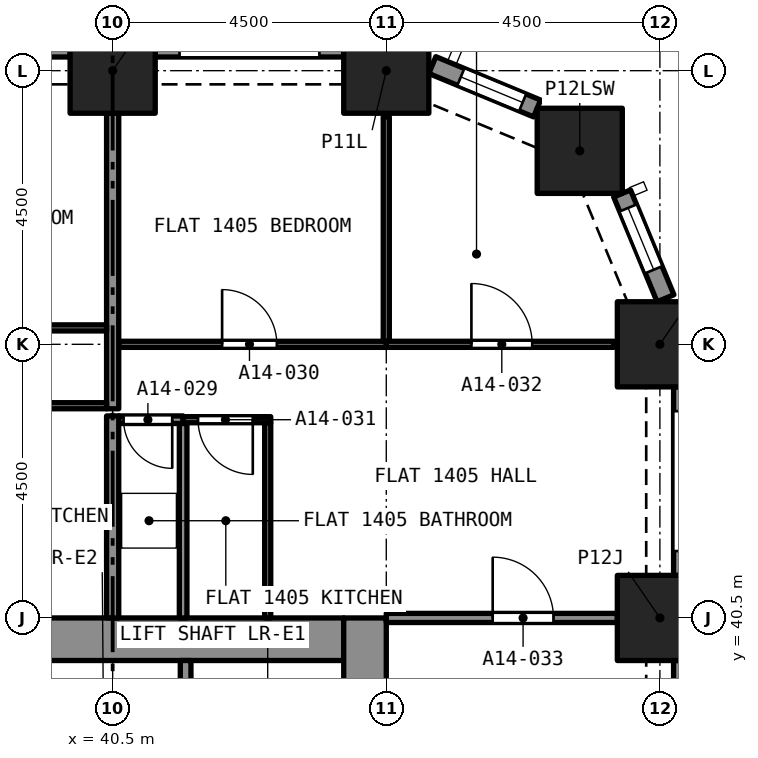
"""IFC4 building model, lengths in metres.
Left out: names, types, materials, properties, quantities, classifications, styles, units other than length and angle.
Written with IfcOpenShell. Run it as: python <this file> out.ifc"""

import sys

from ifc_helpers import new_model, si_unit, direction, frame, frame_2d, origin, origin_2d, place, context, subcontext, project, spatial, rectangle, extrude, element, fill, save


model = new_model("IFC4")
c1 = context("Model", 3, precision=1e-05, world=origin(), true_north=direction((0.0, 1.0)))
c2 = subcontext(c1, "Body", "Model", "MODEL_VIEW")
j1 = project(units=[si_unit("LENGTHUNIT", "METRE"), si_unit("PLANEANGLEUNIT", "RADIAN")], contexts=[c1])
p1 = place(None, origin())
s1 = spatial("IfcSite", under=j1, at=p1, CompositionType="ELEMENT")
p2 = place(p1, origin())
s2 = spatial("IfcBuilding", under=s1, at=p2, CompositionType="ELEMENT")
p3 = place(p2, frame((0.0, 0.0, 56.0)))
s3 = spatial("IfcBuildingStorey", under=s2, at=p3, CompositionType="ELEMENT", Elevation=56.0)
for number, where, z_axis, x_axis in (
    (1, (49.5, 40.5, 0.0), (0.0, 0.0, 1.0), (1.0, 0.0, 0.0)),
    (2, (49.5, 45.0, 0.0), (0.0, 0.0, 1.0), (1.0, 0.0, 0.0)),
    (3, (48.182, 48.182, 0.0), (0.0, 0.0, 1.0), (1.0, 0.0, 0.0)),
    (4, (40.5, 49.5, 0.0), (0.0, 0.0, 1.0), (1.0, 0.0, 0.0)),
    (5, (45.0, 49.5, 0.0), (0.0, 0.0, 1.0), (1.0, 0.0, 0.0)),
):
    element("IfcColumn", number, at=place(p3, frame(where, z_axis=z_axis, x_axis=x_axis)), inside=s3, PredefinedType="COLUMN", context=c2, shape_type="SweptSolid", body=[
        extrude(rectangle(XDim=1.4, YDim=1.4, at=origin_2d()), origin(), (0.0, 0.0, 1.0), 3.2),
    ])
p4 = place(p3, frame((36.7, 40.15, 0.0), z_axis=(0.0, 0.0, 1.0), x_axis=(1.0, 0.0, 0.0)))
e6 = element("IfcWall", 6, at=p4, inside=s3, PredefinedType="SOLIDWALL", context=c2, shape_type="SweptSolid", body=[
    extrude(rectangle(XDim=7.6, YDim=0.7, at=frame_2d((3.8, 0.0))), origin(), (0.0, 0.0, 1.0), 3.2),
])
p5 = place(p3, frame((44.65, 27.0, 0.0), z_axis=(0.0, 0.0, 1.0), x_axis=(0.0, 1.0, 0.0)))
e7 = element("IfcWall", 7, at=p5, inside=s3, PredefinedType="SOLIDWALL", context=c2, shape_type="SweptSolid", body=[
    extrude(rectangle(XDim=13.5, YDim=0.7, at=frame_2d((6.75, 0.0))), origin(), (0.0, 0.0, 1.0), 3.2),
])
p6 = place(p5, frame((8.95, 0.0, 0.0)))
e8 = element("IfcOpeningElement", 8, at=p6, cuts=e7, PredefinedType="OPENING", context=c2, shape_type="SweptSolid", body=[
    extrude(rectangle(XDim=1.2, YDim=2.1, at=frame_2d((0.6, 1.05))), frame((0.0, 0.36, 0.0), z_axis=(0.0, -1.0, 0.0), x_axis=(1.0, 0.0, 0.0)), (0.0, 0.0, 1.0), 0.72),
])
p7 = place(p3, frame((49.875, 39.8, 0.0), z_axis=(0.0, 0.0, 1.0), x_axis=(0.0, -1.0, 0.0)))
e9 = element("IfcWall", 9, at=p7, inside=s3, PredefinedType="SOLIDWALL", context=c2, shape_type="SweptSolid", body=[
    extrude(rectangle(XDim=3.1, YDim=0.3, at=frame_2d((1.55, 0.0))), origin(), (0.0, 0.0, 1.0), 3.2),
])
p8 = place(p7, frame((0.4, 0.0, 0.45)))
e10 = element("IfcOpeningElement", 10, at=p8, cuts=e9, PredefinedType="OPENING", context=c2, shape_type="SweptSolid", body=[
    extrude(rectangle(XDim=2.3, YDim=1.95, at=frame_2d((1.15, 0.975))), frame((0.0, 0.16, 0.0), z_axis=(0.0, -1.0, 0.0), x_axis=(1.0, 0.0, 0.0)), (0.0, 0.0, 1.0), 0.32),
])
p9 = place(p3, frame((49.875, 44.3, 0.0), z_axis=(0.0, 0.0, 1.0), x_axis=(0.0, -1.0, 0.0)))
e11 = element("IfcWall", 11, at=p9, inside=s3, PredefinedType="SOLIDWALL", context=c2, shape_type="SweptSolid", body=[
    extrude(rectangle(XDim=3.1, YDim=0.3, at=frame_2d((1.55, 0.0))), origin(), (0.0, 0.0, 1.0), 3.2),
])
p10 = place(p9, frame((0.4, 0.0, 0.45)))
e12 = element("IfcOpeningElement", 12, at=p10, cuts=e11, PredefinedType="OPENING", context=c2, shape_type="SweptSolid", body=[
    extrude(rectangle(XDim=2.3, YDim=1.95, at=frame_2d((1.15, 0.975))), frame((0.0, 0.16, 0.0), z_axis=(0.0, -1.0, 0.0), x_axis=(1.0, 0.0, 0.0)), (0.0, 0.0, 1.0), 0.32),
])
p11 = place(p3, frame((48.878, 47.48, 0.0), z_axis=(0.0, 0.0, 1.0), x_axis=(0.38262540684, -0.923903565336, 0.0)))
e13 = element("IfcWall", 13, at=p11, inside=s3, PredefinedType="SOLIDWALL", context=c2, shape_type="SweptSolid", body=[
    extrude(rectangle(XDim=1.865, YDim=0.3, at=frame_2d((0.933, 0.0))), origin(), (0.0, 0.0, 1.0), 3.2),
])
p12 = place(p11, frame((0.258, 0.0, 0.45)))
e14 = element("IfcOpeningElement", 14, at=p12, cuts=e13, PredefinedType="OPENING", context=c2, shape_type="SweptSolid", body=[
    extrude(rectangle(XDim=1.1, YDim=1.95, at=frame_2d((0.55, 0.975))), frame((0.0, 0.16, 0.0), z_axis=(0.0, -1.0, 0.0), x_axis=(1.0, 0.0, 0.0)), (0.0, 0.0, 1.0), 0.32),
])
p13 = place(p3, frame((45.757, 49.592, 0.0), z_axis=(0.0, 0.0, 1.0), x_axis=(0.923857286003, -0.382737135771, 0.0)))
e15 = element("IfcWall", 15, at=p13, inside=s3, PredefinedType="SOLIDWALL", context=c2, shape_type="SweptSolid", body=[
    extrude(rectangle(XDim=1.865, YDim=0.3, at=frame_2d((0.933, 0.0))), origin(), (0.0, 0.0, 1.0), 3.2),
])
p14 = place(p13, frame((0.508, 0.0, 0.45)))
e16 = element("IfcOpeningElement", 16, at=p14, cuts=e15, PredefinedType="OPENING", context=c2, shape_type="SweptSolid", body=[
    extrude(rectangle(XDim=1.1, YDim=1.95, at=frame_2d((0.55, 0.975))), frame((0.0, 0.16, 0.0), z_axis=(0.0, -1.0, 0.0), x_axis=(1.0, 0.0, 0.0)), (0.0, 0.0, 1.0), 0.32),
])
p15 = place(p3, frame((41.2, 49.875, 0.0), z_axis=(0.0, 0.0, 1.0), x_axis=(1.0, 0.0, 0.0)))
e17 = element("IfcWall", 17, at=p15, inside=s3, PredefinedType="SOLIDWALL", context=c2, shape_type="SweptSolid", body=[
    extrude(rectangle(XDim=3.1, YDim=0.3, at=frame_2d((1.55, 0.0))), origin(), (0.0, 0.0, 1.0), 3.2),
])
p16 = place(p15, frame((0.4, 0.0, 0.45)))
e18 = element("IfcOpeningElement", 18, at=p16, cuts=e17, PredefinedType="OPENING", context=c2, shape_type="SweptSolid", body=[
    extrude(rectangle(XDim=2.3, YDim=1.95, at=frame_2d((1.15, 0.975))), frame((0.0, 0.16, 0.0), z_axis=(0.0, -1.0, 0.0), x_axis=(1.0, 0.0, 0.0)), (0.0, 0.0, 1.0), 0.32),
])
p17 = place(p3, frame((36.7, 49.875, 0.0), z_axis=(0.0, 0.0, 1.0), x_axis=(1.0, 0.0, 0.0)))
e19 = element("IfcWall", 19, at=p17, inside=s3, PredefinedType="SOLIDWALL", context=c2, shape_type="SweptSolid", body=[
    extrude(rectangle(XDim=3.1, YDim=0.3, at=frame_2d((1.55, 0.0))), origin(), (0.0, 0.0, 1.0), 3.2),
])
p18 = place(p17, frame((0.4, 0.0, 0.45)))
e20 = element("IfcOpeningElement", 20, at=p18, cuts=e19, PredefinedType="OPENING", context=c2, shape_type="SweptSolid", body=[
    extrude(rectangle(XDim=2.3, YDim=1.95, at=frame_2d((1.15, 0.975))), frame((0.0, 0.16, 0.0), z_axis=(0.0, -1.0, 0.0), x_axis=(1.0, 0.0, 0.0)), (0.0, 0.0, 1.0), 0.32),
])
p19 = place(p3, frame((41.659, 43.76, 0.0), z_axis=(0.0, 0.0, 1.0), x_axis=(-1.0, 0.0, 0.0)))
e21 = element("IfcWall", 21, at=p19, inside=s3, PredefinedType="PARTITIONING", context=c2, shape_type="SweptSolid", body=[
    extrude(rectangle(XDim=1.059, YDim=0.125, at=frame_2d((0.53, 0.0))), origin(), (0.0, 0.0, 1.0), 2.9),
])
p20 = place(p19, frame((0.179, 0.0, 0.0)))
e22 = element("IfcOpeningElement", 22, at=p20, cuts=e21, PredefinedType="OPENING", context=c2, shape_type="SweptSolid", body=[
    extrude(rectangle(XDim=0.8, YDim=2.1, at=frame_2d((0.4, 1.05))), frame((0.0, 0.073, 0.0), z_axis=(0.0, -1.0, 0.0), x_axis=(1.0, 0.0, 0.0)), (0.0, 0.0, 1.0), 0.145),
])
p21 = place(p3, frame((41.659, 40.5, 0.0), z_axis=(0.0, 0.0, 1.0), x_axis=(0.0, 1.0, 0.0)))
e23 = element("IfcWall", 23, at=p21, inside=s3, PredefinedType="PARTITIONING", context=c2, shape_type="SweptSolid", body=[
    extrude(rectangle(XDim=3.198, YDim=0.125, at=frame_2d((1.599, 0.0))), origin(), (0.0, 0.0, 1.0), 2.9),
])
p22 = place(p3, frame((40.5, 40.5, 0.0), z_axis=(0.0, 0.0, 1.0), x_axis=(0.0, 1.0, 0.0)))
e24 = element("IfcWall", 24, at=p22, inside=s3, PredefinedType="PARTITIONING", context=c2, shape_type="SweptSolid", body=[
    extrude(rectangle(XDim=3.323, YDim=0.2, at=frame_2d((1.661, 0.0))), origin(), (0.0, 0.0, 1.0), 2.9),
])
p23 = place(p3, frame((40.6, 45.0, 0.0), z_axis=(0.0, 0.0, 1.0), x_axis=(1.0, 0.0, 0.0)))
e25 = element("IfcWall", 25, at=p23, inside=s3, PredefinedType="PARTITIONING", context=c2, shape_type="SweptSolid", body=[
    extrude(rectangle(XDim=4.4, YDim=0.1, at=frame_2d((2.2, 0.0))), origin(), (0.0, 0.0, 1.0), 2.9),
])
p24 = place(p23, frame((1.7, 0.0, 0.0)))
e26 = element("IfcOpeningElement", 26, at=p24, cuts=e25, PredefinedType="OPENING", context=c2, shape_type="SweptSolid", body=[
    extrude(rectangle(XDim=0.9, YDim=2.1, at=frame_2d((0.45, 1.05))), frame((0.0, 0.06, 0.0), z_axis=(0.0, -1.0, 0.0), x_axis=(1.0, 0.0, 0.0)), (0.0, 0.0, 1.0), 0.12),
])
p25 = place(p3, frame((45.0, 45.05, 0.0), z_axis=(0.0, 0.0, 1.0), x_axis=(0.0, 1.0, 0.0)))
e27 = element("IfcWall", 27, at=p25, inside=s3, PredefinedType="PARTITIONING", context=c2, shape_type="SweptSolid", body=[
    extrude(rectangle(XDim=3.692, YDim=0.1, at=frame_2d((1.846, 0.0))), origin(), (0.0, 0.0, 1.0), 2.9),
])
p26 = place(p3, frame((43.05, 40.5, 0.0), z_axis=(0.0, 0.0, 1.0), x_axis=(0.0, 1.0, 0.0)))
e28 = element("IfcWall", 28, at=p26, inside=s3, PredefinedType="PARTITIONING", context=c2, shape_type="SweptSolid", body=[
    extrude(rectangle(XDim=3.21, YDim=0.1, at=frame_2d((1.605, 0.0))), origin(), (0.0, 0.0, 1.0), 2.9),
])
p27 = place(p3, frame((43.1, 43.76, 0.0), z_axis=(0.0, 0.0, 1.0), x_axis=(-1.0, 0.0, 0.0)))
e29 = element("IfcWall", 29, at=p27, inside=s3, PredefinedType="PARTITIONING", context=c2, shape_type="SweptSolid", body=[
    extrude(rectangle(XDim=1.441, YDim=0.1, at=frame_2d((0.72, 0.0))), origin(), (0.0, 0.0, 1.0), 2.9),
])
p28 = place(p27, frame((0.295, 0.0, 0.0)))
e30 = element("IfcOpeningElement", 30, at=p28, cuts=e29, PredefinedType="OPENING", context=c2, shape_type="SweptSolid", body=[
    extrude(rectangle(XDim=0.9, YDim=2.1, at=frame_2d((0.45, 1.05))), frame((0.0, 0.06, 0.0), z_axis=(0.0, -1.0, 0.0), x_axis=(1.0, 0.0, 0.0)), (0.0, 0.0, 1.0), 0.12),
])
p29 = place(p3, frame((45.0, 45.0, 0.0), z_axis=(0.0, 0.0, 1.0), x_axis=(1.0, 0.0, 0.0)))
e31 = element("IfcWall", 31, at=p29, inside=s3, PredefinedType="PARTITIONING", context=c2, shape_type="SweptSolid", body=[
    extrude(rectangle(XDim=3.742, YDim=0.1, at=frame_2d((1.871, 0.0))), origin(), (0.0, 0.0, 1.0), 2.9),
])
p30 = place(p29, frame((1.4, 0.0, 0.0)))
e32 = element("IfcOpeningElement", 32, at=p30, cuts=e31, PredefinedType="OPENING", context=c2, shape_type="SweptSolid", body=[
    extrude(rectangle(XDim=1.0, YDim=2.1, at=frame_2d((0.5, 1.05))), frame((0.0, 0.06, 0.0), z_axis=(0.0, -1.0, 0.0), x_axis=(1.0, 0.0, 0.0)), (0.0, 0.0, 1.0), 0.12),
])
p31 = place(p3, frame((40.5, 43.94, 0.0), z_axis=(0.0, 0.0, 1.0), x_axis=(0.0, 1.0, 0.0)))
e33 = element("IfcWall", 33, at=p31, inside=s3, PredefinedType="PARTITIONING", context=c2, shape_type="SweptSolid", body=[
    extrude(rectangle(XDim=4.86, YDim=0.2, at=frame_2d((2.43, 0.0))), origin(), (0.0, 0.0, 1.0), 2.9),
])
p32 = place(p3, frame((45.0, 40.5, 0.0), z_axis=(0.0, 0.0, 1.0), x_axis=(1.0, 0.0, 0.0)))
e34 = element("IfcWall", 34, at=p32, inside=s3, PredefinedType="PARTITIONING", context=c2, shape_type="SweptSolid", body=[
    extrude(rectangle(XDim=3.8, YDim=0.15, at=frame_2d((1.9, 0.0))), origin(), (0.0, 0.0, 1.0), 2.9),
])
p33 = place(p32, frame((1.75, 0.0, 0.0)))
e35 = element("IfcOpeningElement", 35, at=p33, cuts=e34, PredefinedType="OPENING", context=c2, shape_type="SweptSolid", body=[
    extrude(rectangle(XDim=1.0, YDim=2.1, at=frame_2d((0.5, 1.05))), frame((0.0, 0.085, 0.0), z_axis=(0.0, -1.0, 0.0), x_axis=(1.0, 0.0, 0.0)), (0.0, 0.0, 1.0), 0.17),
])
p34 = place(p3, frame((36.0, 45.27, 0.0), z_axis=(0.0, 0.0, 1.0), x_axis=(1.0, 0.0, 0.0)))
e36 = element("IfcWall", 36, at=p34, inside=s3, PredefinedType="PARTITIONING", context=c2, shape_type="SweptSolid", body=[
    extrude(rectangle(XDim=4.4, YDim=0.1, at=frame_2d((2.2, 0.0))), origin(), (0.0, 0.0, 1.0), 2.9),
])
p35 = place(p34, frame((1.8, 0.0, 0.0)))
e37 = element("IfcOpeningElement", 37, at=p35, cuts=e36, PredefinedType="OPENING", context=c2, shape_type="SweptSolid", body=[
    extrude(rectangle(XDim=0.9, YDim=2.1, at=frame_2d((0.45, 1.05))), frame((0.0, 0.06, 0.0), z_axis=(0.0, -1.0, 0.0), x_axis=(1.0, 0.0, 0.0)), (0.0, 0.0, 1.0), 0.12),
])
p36 = place(p3, frame((40.4, 43.99, 0.0), z_axis=(0.0, 0.0, 1.0), x_axis=(-1.0, 0.0, 0.0)))
e38 = element("IfcWall", 38, at=p36, inside=s3, PredefinedType="PARTITIONING", context=c2, shape_type="SweptSolid", body=[
    extrude(rectangle(XDim=3.25, YDim=0.1, at=frame_2d((1.625, 0.0))), origin(), (0.0, 0.0, 1.0), 2.9),
])
p37 = place(p36, frame((1.125, 0.0, 0.0)))
e39 = element("IfcOpeningElement", 39, at=p37, cuts=e38, PredefinedType="OPENING", context=c2, shape_type="SweptSolid", body=[
    extrude(rectangle(XDim=0.9, YDim=2.1, at=frame_2d((0.45, 1.05))), frame((0.0, 0.06, 0.0), z_axis=(0.0, -1.0, 0.0), x_axis=(1.0, 0.0, 0.0)), (0.0, 0.0, 1.0), 0.12),
])
p38 = place(p3, frame((41.7, 37.5, 0.0), z_axis=(0.0, 0.0, 1.0), x_axis=(0.0, 1.0, 0.0)))
e40 = element("IfcWall", 40, at=p38, inside=s3, PredefinedType="SOLIDWALL", context=c2, shape_type="SweptSolid", body=[
    extrude(rectangle(XDim=2.3, YDim=0.175, at=frame_2d((1.15, 0.0))), origin(), (0.0, 0.0, 1.0), 2.9),
])
p39 = place(p12, origin())
e41 = element("IfcWindow", 41, at=p39, inside=s3, PartitioningType="SINGLE_PANEL", PredefinedType="WINDOW", context=c2, shape_type="SweptSolid", body=[
    extrude(rectangle(XDim=1.1, YDim=1.95, at=frame_2d((0.55, 0.975))), frame((0.0, 0.03, 0.0), z_axis=(0.0, -1.0, 0.0), x_axis=(1.0, 0.0, 0.0)), (0.0, 0.0, 1.0), 0.06),
])
fill(e14, e41)
p40 = place(p14, origin())
e42 = element("IfcWindow", 42, at=p40, inside=s3, PartitioningType="SINGLE_PANEL", PredefinedType="WINDOW", context=c2, shape_type="SweptSolid", body=[
    extrude(rectangle(XDim=1.1, YDim=1.95, at=frame_2d((0.55, 0.975))), frame((0.0, 0.03, 0.0), z_axis=(0.0, -1.0, 0.0), x_axis=(1.0, 0.0, 0.0)), (0.0, 0.0, 1.0), 0.06),
])
fill(e16, e42)
p41 = place(p20, origin())
e43 = element("IfcDoor", 43, at=p41, inside=s3, OperationType="SINGLE_SWING_RIGHT", PredefinedType="DOOR", context=c2, shape_type="SweptSolid", body=[
    extrude(rectangle(XDim=0.8, YDim=2.1, at=frame_2d((0.4, 1.05))), frame((0.0, 0.025, 0.0), z_axis=(0.0, -1.0, 0.0), x_axis=(1.0, 0.0, 0.0)), (0.0, 0.0, 1.0), 0.05),
])
fill(e22, e43)
p42 = place(p24, origin())
e44 = element("IfcDoor", 44, at=p42, inside=s3, OperationType="SINGLE_SWING_LEFT", PredefinedType="DOOR", context=c2, shape_type="SweptSolid", body=[
    extrude(rectangle(XDim=0.9, YDim=2.1, at=frame_2d((0.45, 1.05))), frame((0.0, 0.025, 0.0), z_axis=(0.0, -1.0, 0.0), x_axis=(1.0, 0.0, 0.0)), (0.0, 0.0, 1.0), 0.05),
])
fill(e26, e44)
p43 = place(p28, origin())
e45 = element("IfcDoor", 45, at=p43, inside=s3, OperationType="SINGLE_SWING_RIGHT", PredefinedType="DOOR", context=c2, shape_type="SweptSolid", body=[
    extrude(rectangle(XDim=0.9, YDim=2.1, at=frame_2d((0.45, 1.05))), frame((0.0, 0.025, 0.0), z_axis=(0.0, -1.0, 0.0), x_axis=(1.0, 0.0, 0.0)), (0.0, 0.0, 1.0), 0.05),
])
fill(e30, e45)
p44 = place(p30, origin())
e46 = element("IfcDoor", 46, at=p44, inside=s3, OperationType="SINGLE_SWING_RIGHT", PredefinedType="DOOR", context=c2, shape_type="SweptSolid", body=[
    extrude(rectangle(XDim=1.0, YDim=2.1, at=frame_2d((0.5, 1.05))), frame((0.0, 0.025, 0.0), z_axis=(0.0, -1.0, 0.0), x_axis=(1.0, 0.0, 0.0)), (0.0, 0.0, 1.0), 0.05),
])
fill(e32, e46)
p45 = place(p33, origin())
e47 = element("IfcDoor", 47, at=p45, inside=s3, OperationType="SINGLE_SWING_RIGHT", PredefinedType="DOOR", context=c2, shape_type="SweptSolid", body=[
    extrude(rectangle(XDim=1.0, YDim=2.1, at=frame_2d((0.5, 1.05))), frame((0.0, 0.025, 0.0), z_axis=(0.0, -1.0, 0.0), x_axis=(1.0, 0.0, 0.0)), (0.0, 0.0, 1.0), 0.05),
])
fill(e35, e47)
save(model, sys.argv[1])
